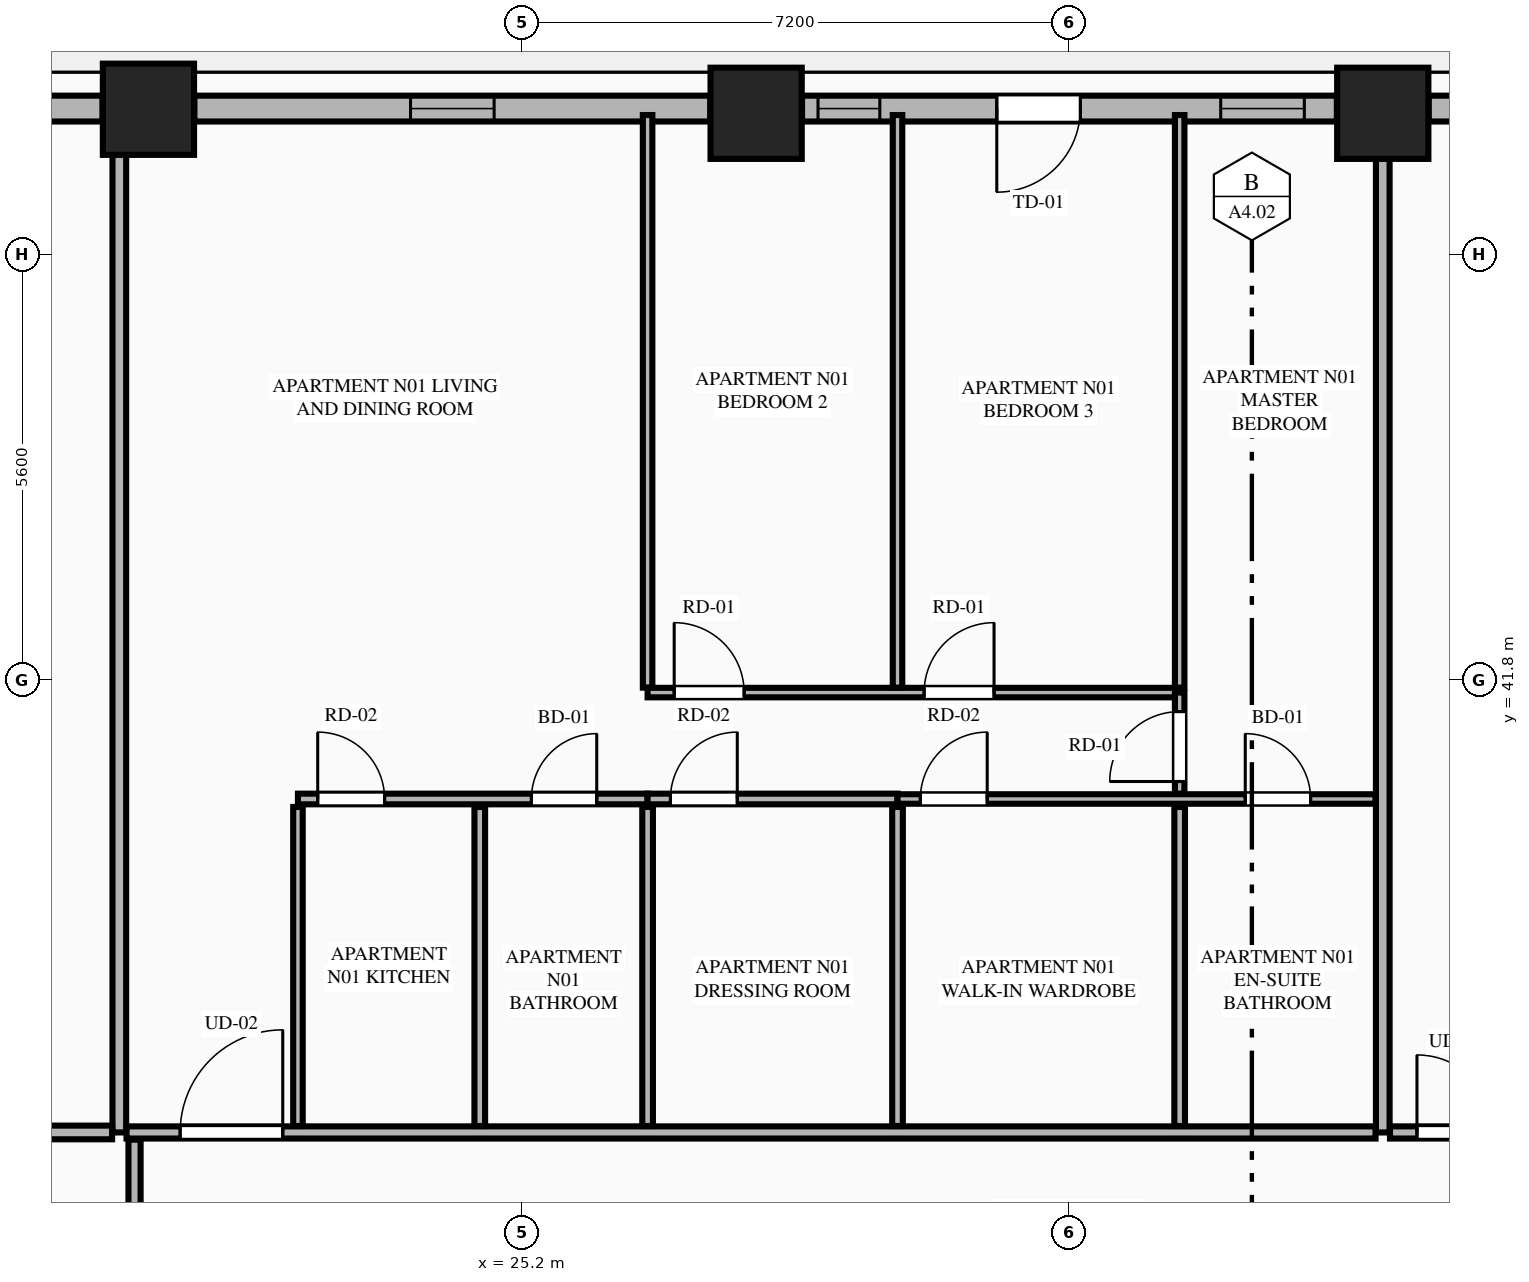
"""IFC4 building model, lengths in metres.
Left out: names, types, materials, properties, quantities, classifications, styles, units other than length and angle.
Written with IfcOpenShell. Run it as: python <this file> out.ifc"""

import sys

from ifc_helpers import new_model, si_unit, direction, frame, frame_2d, origin, origin_2d, place, context, subcontext, project, spatial, rectangle, extrude, element, fill, save


model = new_model("IFC4")
c1 = context("Model", 3, precision=1e-05, world=origin(), true_north=direction((0.0, 1.0)))
c2 = subcontext(c1, "Body", "Model", "MODEL_VIEW")
j1 = project(units=[si_unit("LENGTHUNIT", "METRE"), si_unit("PLANEANGLEUNIT", "RADIAN")], contexts=[c1])
p1 = place(None, origin())
s1 = spatial("IfcSite", under=j1, at=p1, CompositionType="ELEMENT")
p2 = place(p1, origin())
s2 = spatial("IfcBuilding", under=s1, at=p2, CompositionType="ELEMENT")
p3 = place(p2, frame((0.0, 0.0, 67.5)))
s3 = spatial("IfcBuildingStorey", under=s2, at=p3, CompositionType="ELEMENT", Elevation=67.5)
for number, where, z_axis, x_axis in (
    (1, (36.522, 49.258, 0.0), (0.0, 0.0, 1.0), (1.0, 0.0, 0.0)),
    (2, (28.278, 49.258, 0.0), (0.0, 0.0, 1.0), (1.0, 0.0, 0.0)),
    (3, (20.283, 49.311, 0.0), (0.0, 0.0, 1.0), (1.0, 0.0, 0.0)),
):
    element("IfcColumn", number, at=place(p3, frame(where, z_axis=z_axis, x_axis=x_axis)), inside=s3, PredefinedType="COLUMN", context=c2, shape_type="SweptSolid", body=[
        extrude(rectangle(XDim=1.2, YDim=1.2, at=origin_2d()), origin(), (0.0, 0.0, 1.0), 3.55),
    ])
p4 = place(p3, frame((43.913, 49.32, 0.0), z_axis=(0.0, 0.0, 1.0), x_axis=(-1.0, 0.0, 0.0)))
e4 = element("IfcWall", 4, at=p4, inside=s3, PredefinedType="STANDARD", context=c2, shape_type="SweptSolid", body=[
    extrude(rectangle(XDim=6.787, YDim=0.34, at=frame_2d((3.394, 0.0))), origin(), (0.0, 0.0, 1.0), 2.787),
])
p5 = place(p4, frame((2.843, 0.0, 0.75)))
e5 = element("IfcOpeningElement", 5, at=p5, cuts=e4, PredefinedType="OPENING", context=c2, shape_type="SweptSolid", body=[
    extrude(rectangle(XDim=1.1, YDim=1.887, at=frame_2d((0.55, 0.943))), frame((0.0, 0.18, 0.0), z_axis=(0.0, -1.0, 0.0), x_axis=(1.0, 0.0, 0.0)), (0.0, 0.0, 1.0), 0.36),
])
p6 = place(p3, frame((35.918, 49.32, 0.0), z_axis=(0.0, 0.0, 1.0), x_axis=(-1.0, 0.0, 0.0)))
e6 = element("IfcWall", 6, at=p6, inside=s3, PredefinedType="STANDARD", context=c2, shape_type="SweptSolid", body=[
    extrude(rectangle(XDim=7.036, YDim=0.34, at=frame_2d((3.518, 0.0))), origin(), (0.0, 0.0, 1.0), 2.787),
])
p7 = place(p6, frame((3.374, 0.0, 0.0)))
e7 = element("IfcOpeningElement", 7, at=p7, cuts=e6, PredefinedType="OPENING", context=c2, shape_type="SweptSolid", body=[
    extrude(rectangle(XDim=1.1, YDim=2.25, at=frame_2d((0.55, 1.125))), frame((0.0, 0.18, 0.0), z_axis=(0.0, -1.0, 0.0), x_axis=(1.0, 0.0, 0.0)), (0.0, 0.0, 1.0), 0.36),
])
p8 = place(p6, frame((0.428, 0.0, 0.75)))
e8 = element("IfcOpeningElement", 8, at=p8, cuts=e6, PredefinedType="OPENING", context=c2, shape_type="SweptSolid", body=[
    extrude(rectangle(XDim=1.1, YDim=1.887, at=frame_2d((0.55, 0.943))), frame((0.0, 0.18, 0.0), z_axis=(0.0, -1.0, 0.0), x_axis=(1.0, 0.0, 0.0)), (0.0, 0.0, 1.0), 0.36),
])
p9 = place(p6, frame((6.013, 0.0, 0.75)))
e9 = element("IfcOpeningElement", 9, at=p9, cuts=e6, PredefinedType="OPENING", context=c2, shape_type="SweptSolid", body=[
    extrude(rectangle(XDim=0.813, YDim=1.887, at=frame_2d((0.406, 0.943))), frame((0.0, 0.18, 0.0), z_axis=(0.0, -1.0, 0.0), x_axis=(1.0, 0.0, 0.0)), (0.0, 0.0, 1.0), 0.36),
])
p10 = place(p3, frame((27.674, 49.32, 0.0), z_axis=(0.0, 0.0, 1.0), x_axis=(-1.0, 0.0, 0.0)))
e10 = element("IfcWall", 10, at=p10, inside=s3, PredefinedType="STANDARD", context=c2, shape_type="SweptSolid", body=[
    extrude(rectangle(XDim=6.787, YDim=0.34, at=frame_2d((3.394, 0.0))), origin(), (0.0, 0.0, 1.0), 2.787),
])
p11 = place(p10, frame((2.843, 0.0, 0.75)))
e11 = element("IfcOpeningElement", 11, at=p11, cuts=e10, PredefinedType="OPENING", context=c2, shape_type="SweptSolid", body=[
    extrude(rectangle(XDim=1.1, YDim=1.887, at=frame_2d((0.55, 0.943))), frame((0.0, 0.18, 0.0), z_axis=(0.0, -1.0, 0.0), x_axis=(1.0, 0.0, 0.0)), (0.0, 0.0, 1.0), 0.36),
])
p12 = place(p3, frame((19.679, 49.32, 0.0), z_axis=(0.0, 0.0, 1.0), x_axis=(-1.0, 0.0, 0.0)))
e12 = element("IfcWall", 12, at=p12, inside=s3, PredefinedType="STANDARD", context=c2, shape_type="SweptSolid", body=[
    extrude(rectangle(XDim=1.245, YDim=0.34, at=frame_2d((0.623, 0.0))), origin(), (0.0, 0.0, 1.0), 3.33),
])
p13 = place(p3, frame((19.9, 35.85, 0.0), z_axis=(0.0, 0.0, 1.0), x_axis=(0.0, 1.0, 0.0)))
e13 = element("IfcWall", 13, at=p13, inside=s3, PredefinedType="PARTITIONING", context=c2, shape_type="SweptSolid", body=[
    extrude(rectangle(XDim=13.295, YDim=0.18, at=frame_2d((6.647, 0.0))), origin(), (0.0, 0.0, 1.0), 3.33),
])
p14 = place(p3, frame((36.522, 35.85, 0.0), z_axis=(0.0, 0.0, 1.0), x_axis=(0.0, 1.0, 0.0)))
e14 = element("IfcWall", 14, at=p14, inside=s3, PredefinedType="PARTITIONING", context=c2, shape_type="SweptSolid", body=[
    extrude(rectangle(XDim=13.295, YDim=0.18, at=frame_2d((6.647, 0.0))), origin(), (0.0, 0.0, 1.0), 2.636),
])
p15 = place(p3, frame((19.995, 35.85, 0.0), z_axis=(0.0, 0.0, 1.0), x_axis=(1.0, 0.0, 0.0)))
e15 = element("IfcWall", 15, at=p15, inside=s3, PredefinedType="PARTITIONING", context=c2, shape_type="SweptSolid", body=[
    extrude(rectangle(XDim=16.432, YDim=0.16, at=frame_2d((8.216, 0.0))), origin(), (0.0, 0.0, 1.0), 3.33),
])
p16 = place(p15, frame((0.705, 0.0, 0.0)))
e16 = element("IfcOpeningElement", 16, at=p16, cuts=e15, PredefinedType="OPENING", context=c2, shape_type="SweptSolid", body=[
    extrude(rectangle(XDim=1.35, YDim=2.35, at=frame_2d((0.675, 1.175))), frame((0.0, 0.09, 0.0), z_axis=(0.0, -1.0, 0.0), x_axis=(1.0, 0.0, 0.0)), (0.0, 0.0, 1.0), 0.18),
])
p17 = place(p3, frame((22.25, 35.935, 0.0), z_axis=(0.0, 0.0, 1.0), x_axis=(0.0, 1.0, 0.0)))
e17 = element("IfcWall", 17, at=p17, inside=s3, PredefinedType="PARTITIONING", context=c2, shape_type="SweptSolid", body=[
    extrude(rectangle(XDim=4.197, YDim=0.125, at=frame_2d((2.099, 0.0))), origin(), (0.0, 0.0, 1.0), 2.636),
])
p18 = place(p3, frame((22.25, 40.237, 0.0), z_axis=(0.0, 0.0, 1.0), x_axis=(1.0, 0.0, 0.0)))
e18 = element("IfcWall", 18, at=p18, inside=s3, PredefinedType="PLUMBINGWALL", context=c2, shape_type="SweptSolid", body=[
    extrude(rectangle(XDim=4.6, YDim=0.14, at=frame_2d((2.3, 0.0))), origin(), (0.0, 0.0, 1.0), 3.33),
])
p19 = place(p18, frame((3.071, 0.0, 0.0)))
e19 = element("IfcOpeningElement", 19, at=p19, cuts=e18, PredefinedType="OPENING", context=c2, shape_type="SweptSolid", body=[
    extrude(rectangle(XDim=0.86, YDim=2.1, at=frame_2d((0.43, 1.05))), frame((0.0, 0.08, 0.0), z_axis=(0.0, -1.0, 0.0), x_axis=(1.0, 0.0, 0.0)), (0.0, 0.0, 1.0), 0.16),
])
p20 = place(p18, frame((0.26, 0.0, 0.0)))
e20 = element("IfcOpeningElement", 20, at=p20, cuts=e18, PredefinedType="OPENING", context=c2, shape_type="SweptSolid", body=[
    extrude(rectangle(XDim=0.88, YDim=2.15, at=frame_2d((0.44, 1.075))), frame((0.0, 0.08, 0.0), z_axis=(0.0, -1.0, 0.0), x_axis=(1.0, 0.0, 0.0)), (0.0, 0.0, 1.0), 0.16),
])
p21 = place(p3, frame((26.85, 40.237, 0.0), z_axis=(0.0, 0.0, 1.0), x_axis=(1.0, 0.0, 0.0)))
e21 = element("IfcWall", 21, at=p21, inside=s3, PredefinedType="PLUMBINGWALL", context=c2, shape_type="SweptSolid", body=[
    extrude(rectangle(XDim=3.288, YDim=0.14, at=frame_2d((1.644, 0.0))), origin(), (0.0, 0.0, 1.0), 3.33),
])
p22 = place(p21, frame((0.3, 0.0, 0.0)))
e22 = element("IfcOpeningElement", 22, at=p22, cuts=e21, PredefinedType="OPENING", context=c2, shape_type="SweptSolid", body=[
    extrude(rectangle(XDim=0.88, YDim=2.15, at=frame_2d((0.44, 1.075))), frame((0.0, 0.08, 0.0), z_axis=(0.0, -1.0, 0.0), x_axis=(1.0, 0.0, 0.0)), (0.0, 0.0, 1.0), 0.16),
])
p23 = place(p3, frame((30.138, 40.237, 0.0), z_axis=(0.0, 0.0, 1.0), x_axis=(1.0, 0.0, 0.0)))
e23 = element("IfcWall", 23, at=p23, inside=s3, PredefinedType="PARTITIONING", context=c2, shape_type="SweptSolid", body=[
    extrude(rectangle(XDim=6.289, YDim=0.125, at=frame_2d((3.145, 0.0))), origin(), (0.0, 0.0, 1.0), 3.33),
])
p24 = place(p23, frame((4.575, 0.0, 0.0)))
e24 = element("IfcOpeningElement", 24, at=p24, cuts=e23, PredefinedType="OPENING", context=c2, shape_type="SweptSolid", body=[
    extrude(rectangle(XDim=0.86, YDim=2.1, at=frame_2d((0.43, 1.05))), frame((0.0, 0.073, 0.0), z_axis=(0.0, -1.0, 0.0), x_axis=(1.0, 0.0, 0.0)), (0.0, 0.0, 1.0), 0.145),
])
p25 = place(p23, frame((0.3, 0.0, 0.0)))
e25 = element("IfcOpeningElement", 25, at=p25, cuts=e23, PredefinedType="OPENING", context=c2, shape_type="SweptSolid", body=[
    extrude(rectangle(XDim=0.88, YDim=2.15, at=frame_2d((0.44, 1.075))), frame((0.0, 0.073, 0.0), z_axis=(0.0, -1.0, 0.0), x_axis=(1.0, 0.0, 0.0)), (0.0, 0.0, 1.0), 0.145),
])
p26 = place(p3, frame((24.642, 35.935, 0.0), z_axis=(0.0, 0.0, 1.0), x_axis=(0.0, 1.0, 0.0)))
e26 = element("IfcWall", 26, at=p26, inside=s3, PredefinedType="PLUMBINGWALL", context=c2, shape_type="SweptSolid", body=[
    extrude(rectangle(XDim=4.197, YDim=0.14, at=frame_2d((2.099, 0.0))), origin(), (0.0, 0.0, 1.0), 3.33),
])
p27 = place(p3, frame((26.85, 41.702, 0.0), z_axis=(0.0, 0.0, 1.0), x_axis=(0.0, 1.0, 0.0)))
e27 = element("IfcWall", 27, at=p27, inside=s3, PredefinedType="PARTITIONING", context=c2, shape_type="SweptSolid", body=[
    extrude(rectangle(XDim=7.533, YDim=0.125, at=frame_2d((3.767, 0.0))), origin(), (0.0, 0.0, 1.0), 3.33),
])
p28 = place(p3, frame((26.85, 41.637, 0.0), z_axis=(0.0, 0.0, 1.0), x_axis=(1.0, 0.0, 0.0)))
e28 = element("IfcWall", 28, at=p28, inside=s3, PredefinedType="PARTITIONING", context=c2, shape_type="SweptSolid", body=[
    extrude(rectangle(XDim=7.0, YDim=0.125, at=frame_2d((3.5, 0.0))), origin(), (0.0, 0.0, 1.0), 3.33),
])
p29 = place(p28, frame((0.35, 0.0, 0.0)))
e29 = element("IfcOpeningElement", 29, at=p29, cuts=e28, PredefinedType="OPENING", context=c2, shape_type="SweptSolid", body=[
    extrude(rectangle(XDim=0.92, YDim=2.15, at=frame_2d((0.46, 1.075))), frame((0.0, 0.073, 0.0), z_axis=(0.0, -1.0, 0.0), x_axis=(1.0, 0.0, 0.0)), (0.0, 0.0, 1.0), 0.145),
])
p30 = place(p28, frame((3.638, 0.0, 0.0)))
e30 = element("IfcOpeningElement", 30, at=p30, cuts=e28, PredefinedType="OPENING", context=c2, shape_type="SweptSolid", body=[
    extrude(rectangle(XDim=0.92, YDim=2.15, at=frame_2d((0.46, 1.075))), frame((0.0, 0.073, 0.0), z_axis=(0.0, -1.0, 0.0), x_axis=(1.0, 0.0, 0.0)), (0.0, 0.0, 1.0), 0.145),
])
p31 = place(p3, frame((33.85, 40.307, 0.0), z_axis=(0.0, 0.0, 1.0), x_axis=(0.0, 1.0, 0.0)))
e31 = element("IfcWall", 31, at=p31, inside=s3, PredefinedType="PARTITIONING", context=c2, shape_type="SweptSolid", body=[
    extrude(rectangle(XDim=1.33, YDim=0.125, at=frame_2d((0.665, 0.0))), origin(), (0.0, 0.0, 1.0), 3.33),
])
p32 = place(p31, frame((0.16, 0.0, 0.0)))
e32 = element("IfcOpeningElement", 32, at=p32, cuts=e31, PredefinedType="OPENING", context=c2, shape_type="SweptSolid", body=[
    extrude(rectangle(XDim=0.92, YDim=2.15, at=frame_2d((0.46, 1.075))), frame((0.0, 0.073, 0.0), z_axis=(0.0, -1.0, 0.0), x_axis=(1.0, 0.0, 0.0)), (0.0, 0.0, 1.0), 0.145),
])
for number, where, z_axis, x_axis in (
    (33, (26.85, 35.935, 0.0), (0.0, 0.0, 1.0), (0.0, 1.0, 0.0)),
    (34, (30.138, 35.935, 0.0), (0.0, 0.0, 1.0), (0.0, 1.0, 0.0)),
):
    element("IfcWall", number, at=place(p3, frame(where, z_axis=z_axis, x_axis=x_axis)), inside=s3, PredefinedType="PLUMBINGWALL", context=c2, shape_type="SweptSolid", body=[
        extrude(rectangle(XDim=4.197, YDim=0.14, at=frame_2d((2.099, 0.0))), origin(), (0.0, 0.0, 1.0), 3.33),
    ])
for number, where, z_axis, x_axis in (
    (35, (30.138, 41.702, 0.0), (0.0, 0.0, 1.0), (0.0, 1.0, 0.0)),
    (36, (33.85, 41.702, 0.0), (0.0, 0.0, 1.0), (0.0, 1.0, 0.0)),
):
    element("IfcWall", number, at=place(p3, frame(where, z_axis=z_axis, x_axis=x_axis)), inside=s3, PredefinedType="PARTITIONING", context=c2, shape_type="SweptSolid", body=[
        extrude(rectangle(XDim=7.533, YDim=0.125, at=frame_2d((3.767, 0.0))), origin(), (0.0, 0.0, 1.0), 3.33),
    ])
p33 = place(p3, frame((33.85, 35.935, 0.0), z_axis=(0.0, 0.0, 1.0), x_axis=(0.0, 1.0, 0.0)))
e37 = element("IfcWall", 37, at=p33, inside=s3, PredefinedType="PLUMBINGWALL", context=c2, shape_type="SweptSolid", body=[
    extrude(rectangle(XDim=4.197, YDim=0.14, at=frame_2d((2.099, 0.0))), origin(), (0.0, 0.0, 1.0), 3.33),
])
p34 = place(p3, frame((36.617, 35.85, 0.0), z_axis=(0.0, 0.0, 1.0), x_axis=(1.0, 0.0, 0.0)))
e38 = element("IfcWall", 38, at=p34, inside=s3, PredefinedType="PARTITIONING", context=c2, shape_type="SweptSolid", body=[
    extrude(rectangle(XDim=8.188, YDim=0.16, at=frame_2d((4.094, 0.0))), origin(), (0.0, 0.0, 1.0), 3.33),
])
p35 = place(p34, frame((0.355, 0.0, 0.0)))
e39 = element("IfcOpeningElement", 39, at=p35, cuts=e38, PredefinedType="OPENING", context=c2, shape_type="SweptSolid", body=[
    extrude(rectangle(XDim=1.02, YDim=2.25, at=frame_2d((0.51, 1.125))), frame((0.0, 0.09, 0.0), z_axis=(0.0, -1.0, 0.0), x_axis=(1.0, 0.0, 0.0)), (0.0, 0.0, 1.0), 0.18),
])
p36 = place(p3, frame((10.665, 35.85, 0.0), z_axis=(0.0, 0.0, 1.0), x_axis=(1.0, 0.0, 0.0)))
e40 = element("IfcWall", 40, at=p36, inside=s3, PredefinedType="PARTITIONING", context=c2, shape_type="SweptSolid", body=[
    extrude(rectangle(XDim=9.14, YDim=0.18, at=frame_2d((4.57, 0.0))), origin(), (0.0, 0.0, 1.0), 3.33),
])
p37 = place(p3, frame((20.1, 29.378, 0.0), z_axis=(0.0, 0.0, 1.0), x_axis=(0.0, 1.0, 0.0)))
e41 = element("IfcWall", 41, at=p37, inside=s3, PredefinedType="PARTITIONING", context=c2, shape_type="SweptSolid", body=[
    extrude(rectangle(XDim=6.377, YDim=0.16, at=frame_2d((3.188, 0.0))), origin(), (0.0, 0.0, 1.0), 3.33),
])
p38 = place(p37, frame((0.4, 0.0, 0.0)))
e42 = element("IfcOpeningElement", 42, at=p38, cuts=e41, PredefinedType="OPENING", context=c2, shape_type="SweptSolid", body=[
    extrude(rectangle(XDim=1.02, YDim=2.25, at=frame_2d((0.51, 1.125))), frame((0.0, 0.09, 0.0), z_axis=(0.0, -1.0, 0.0), x_axis=(1.0, 0.0, 0.0)), (0.0, 0.0, 1.0), 0.18),
])
p39 = place(p7, origin())
e43 = element("IfcDoor", 43, at=p39, inside=s3, OperationType="SINGLE_SWING_RIGHT", PredefinedType="DOOR", context=c2, shape_type="SweptSolid", body=[
    extrude(rectangle(XDim=1.1, YDim=2.25, at=frame_2d((0.55, 1.125))), frame((0.0, 0.025, 0.0), z_axis=(0.0, -1.0, 0.0), x_axis=(1.0, 0.0, 0.0)), (0.0, 0.0, 1.0), 0.05),
])
fill(e7, e43)
p40 = place(p11, origin())
e44 = element("IfcWindow", 44, at=p40, inside=s3, PartitioningType="SINGLE_PANEL", PredefinedType="WINDOW", context=c2, shape_type="SweptSolid", body=[
    extrude(rectangle(XDim=1.1, YDim=1.887, at=frame_2d((0.55, 0.943))), frame((0.0, 0.03, 0.0), z_axis=(0.0, -1.0, 0.0), x_axis=(1.0, 0.0, 0.0)), (0.0, 0.0, 1.0), 0.06),
])
fill(e11, e44)
p41 = place(p19, origin())
e45 = element("IfcDoor", 45, at=p41, inside=s3, OperationType="SINGLE_SWING_RIGHT", PredefinedType="DOOR", context=c2, shape_type="SweptSolid", body=[
    extrude(rectangle(XDim=0.86, YDim=2.1, at=frame_2d((0.43, 1.05))), frame((0.0, 0.025, 0.0), z_axis=(0.0, -1.0, 0.0), x_axis=(1.0, 0.0, 0.0)), (0.0, 0.0, 1.0), 0.05),
])
fill(e19, e45)
p42 = place(p24, origin())
e46 = element("IfcDoor", 46, at=p42, inside=s3, OperationType="SINGLE_SWING_LEFT", PredefinedType="DOOR", context=c2, shape_type="SweptSolid", body=[
    extrude(rectangle(XDim=0.86, YDim=2.1, at=frame_2d((0.43, 1.05))), frame((0.0, 0.025, 0.0), z_axis=(0.0, -1.0, 0.0), x_axis=(1.0, 0.0, 0.0)), (0.0, 0.0, 1.0), 0.05),
])
fill(e24, e46)
p43 = place(p16, origin())
e47 = element("IfcDoor", 47, at=p43, inside=s3, OperationType="SINGLE_SWING_RIGHT", PredefinedType="DOOR", context=c2, shape_type="SweptSolid", body=[
    extrude(rectangle(XDim=1.35, YDim=2.35, at=frame_2d((0.675, 1.175))), frame((0.0, 0.025, 0.0), z_axis=(0.0, -1.0, 0.0), x_axis=(1.0, 0.0, 0.0)), (0.0, 0.0, 1.0), 0.05),
])
fill(e16, e47)
p44 = place(p20, origin())
e48 = element("IfcDoor", 48, at=p44, inside=s3, OperationType="SINGLE_SWING_LEFT", PredefinedType="DOOR", context=c2, shape_type="SweptSolid", body=[
    extrude(rectangle(XDim=0.88, YDim=2.15, at=frame_2d((0.44, 1.075))), frame((0.0, 0.025, 0.0), z_axis=(0.0, -1.0, 0.0), x_axis=(1.0, 0.0, 0.0)), (0.0, 0.0, 1.0), 0.05),
])
fill(e20, e48)
p45 = place(p22, origin())
e49 = element("IfcDoor", 49, at=p45, inside=s3, OperationType="SINGLE_SWING_RIGHT", PredefinedType="DOOR", context=c2, shape_type="SweptSolid", body=[
    extrude(rectangle(XDim=0.88, YDim=2.15, at=frame_2d((0.44, 1.075))), frame((0.0, 0.025, 0.0), z_axis=(0.0, -1.0, 0.0), x_axis=(1.0, 0.0, 0.0)), (0.0, 0.0, 1.0), 0.05),
])
fill(e22, e49)
p46 = place(p29, origin())
e50 = element("IfcDoor", 50, at=p46, inside=s3, OperationType="SINGLE_SWING_LEFT", PredefinedType="DOOR", context=c2, shape_type="SweptSolid", body=[
    extrude(rectangle(XDim=0.92, YDim=2.15, at=frame_2d((0.46, 1.075))), frame((0.0, 0.025, 0.0), z_axis=(0.0, -1.0, 0.0), x_axis=(1.0, 0.0, 0.0)), (0.0, 0.0, 1.0), 0.05),
])
fill(e29, e50)
p47 = place(p30, origin())
e51 = element("IfcDoor", 51, at=p47, inside=s3, OperationType="SINGLE_SWING_RIGHT", PredefinedType="DOOR", context=c2, shape_type="SweptSolid", body=[
    extrude(rectangle(XDim=0.92, YDim=2.15, at=frame_2d((0.46, 1.075))), frame((0.0, 0.025, 0.0), z_axis=(0.0, -1.0, 0.0), x_axis=(1.0, 0.0, 0.0)), (0.0, 0.0, 1.0), 0.05),
])
fill(e30, e51)
p48 = place(p32, origin())
e52 = element("IfcDoor", 52, at=p48, inside=s3, OperationType="SINGLE_SWING_LEFT", PredefinedType="DOOR", context=c2, shape_type="SweptSolid", body=[
    extrude(rectangle(XDim=0.92, YDim=2.15, at=frame_2d((0.46, 1.075))), frame((0.0, 0.025, 0.0), z_axis=(0.0, -1.0, 0.0), x_axis=(1.0, 0.0, 0.0)), (0.0, 0.0, 1.0), 0.05),
])
fill(e32, e52)
p49 = place(p25, origin())
e53 = element("IfcDoor", 53, at=p49, inside=s3, OperationType="SINGLE_SWING_RIGHT", PredefinedType="DOOR", context=c2, shape_type="SweptSolid", body=[
    extrude(rectangle(XDim=0.88, YDim=2.15, at=frame_2d((0.44, 1.075))), frame((0.0, 0.025, 0.0), z_axis=(0.0, -1.0, 0.0), x_axis=(1.0, 0.0, 0.0)), (0.0, 0.0, 1.0), 0.05),
])
fill(e25, e53)
p50 = place(p35, origin())
e54 = element("IfcDoor", 54, at=p50, inside=s3, OperationType="SINGLE_SWING_LEFT", PredefinedType="DOOR", context=c2, shape_type="SweptSolid", body=[
    extrude(rectangle(XDim=1.02, YDim=2.25, at=frame_2d((0.51, 1.125))), frame((0.0, 0.025, 0.0), z_axis=(0.0, -1.0, 0.0), x_axis=(1.0, 0.0, 0.0)), (0.0, 0.0, 1.0), 0.05),
])
fill(e39, e54)
p51 = place(p8, origin())
e55 = element("IfcWindow", 55, at=p51, inside=s3, PartitioningType="SINGLE_PANEL", PredefinedType="WINDOW", context=c2, shape_type="SweptSolid", body=[
    extrude(rectangle(XDim=1.1, YDim=1.887, at=frame_2d((0.55, 0.943))), frame((0.0, 0.03, 0.0), z_axis=(0.0, -1.0, 0.0), x_axis=(1.0, 0.0, 0.0)), (0.0, 0.0, 1.0), 0.06),
])
fill(e8, e55)
p52 = place(p9, origin())
e56 = element("IfcWindow", 56, at=p52, inside=s3, PartitioningType="SINGLE_PANEL", PredefinedType="WINDOW", context=c2, shape_type="SweptSolid", body=[
    extrude(rectangle(XDim=0.813, YDim=1.887, at=frame_2d((0.406, 0.943))), frame((0.0, 0.03, 0.0), z_axis=(0.0, -1.0, 0.0), x_axis=(1.0, 0.0, 0.0)), (0.0, 0.0, 1.0), 0.06),
])
fill(e9, e56)
save(model, sys.argv[1])
